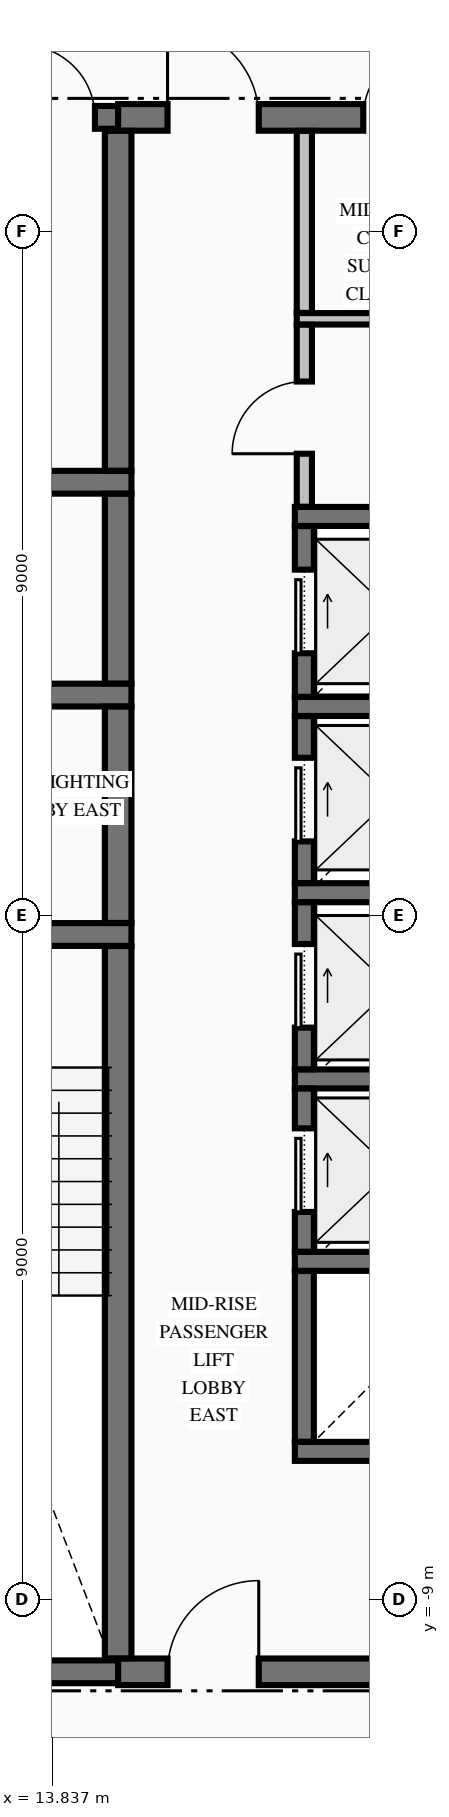
"""IFC4 building model, lengths in metres.
Left out: names, types, materials, properties, quantities, classifications, styles, units other than length and angle.
Written with IfcOpenShell. Run it as: python <this file> out.ifc"""

import sys

from ifc_helpers import new_model, si_unit, direction, frame, frame_2d, origin, place, context, subcontext, project, spatial, rectangle, extrude, element, fill, save


model = new_model("IFC4")
c1 = context("Model", 3, precision=1e-05, world=origin(), true_north=direction((0.0, 1.0)))
c2 = subcontext(c1, "Body", "Model", "MODEL_VIEW")
j1 = project(units=[si_unit("LENGTHUNIT", "METRE"), si_unit("PLANEANGLEUNIT", "RADIAN")], contexts=[c1])
p1 = place(None, origin())
s1 = spatial("IfcSite", under=j1, at=p1, CompositionType="ELEMENT")
p2 = place(p1, origin())
s2 = spatial("IfcBuilding", under=s1, at=p2, CompositionType="ELEMENT")
p3 = place(p2, frame((0.0, 0.0, 132.06)))
s3 = spatial("IfcBuildingStorey", under=s2, at=p3, CompositionType="ELEMENT", Elevation=132.06)
p4 = place(p3, frame((11.504, -9.95, 0.0), z_axis=(0.0, 0.0, 1.0), x_axis=(1.0, 0.0, 0.0)))
e1 = element("IfcWall", 1, at=p4, inside=s3, PredefinedType="SHEAR", context=c2, shape_type="SweptSolid", body=[
    extrude(rectangle(XDim=3.196, YDim=0.3, at=frame_2d((1.598, 0.0))), origin(), (0.0, 0.0, 1.0), 3.32),
])
p5 = place(p3, frame((14.7, -9.95, 0.0), z_axis=(0.0, 0.0, 1.0), x_axis=(1.0, 0.0, 0.0)))
e2 = element("IfcWall", 2, at=p5, inside=s3, PredefinedType="SHEAR", context=c2, shape_type="SweptSolid", body=[
    extrude(rectangle(XDim=4.796, YDim=0.35, at=frame_2d((2.398, 0.0))), origin(), (0.0, 0.0, 1.0), 3.32),
])
p6 = place(p5, frame((0.65, 0.0, 0.0)))
e3 = element("IfcOpeningElement", 3, at=p6, cuts=e2, PredefinedType="OPENING", context=c2, shape_type="SweptSolid", body=[
    extrude(rectangle(XDim=1.2, YDim=2.15, at=frame_2d((0.6, 1.075))), frame((0.0, 0.185, 0.0), z_axis=(0.0, -1.0, 0.0), x_axis=(1.0, 0.0, 0.0)), (0.0, 0.0, 1.0), 0.37),
])
for number, where, z_axis, x_axis in (
    (4, (17.025, -7.05, 0.0), (0.0, 0.0, 1.0), (1.0, 0.0, 0.0)),
    (5, (17.025, -4.55, 0.0), (0.0, 0.0, 1.0), (1.0, 0.0, 0.0)),
    (6, (17.025, -2.15, 0.0), (0.0, 0.0, 1.0), (1.0, 0.0, 0.0)),
):
    element("IfcWall", number, at=place(p3, frame(where, z_axis=z_axis, x_axis=x_axis)), inside=s3, PredefinedType="SOLIDWALL", context=c2, shape_type="SweptSolid", body=[
        extrude(rectangle(XDim=3.15, YDim=0.25, at=frame_2d((1.575, 0.0))), origin(), (0.0, 0.0, 1.0), 3.32),
    ])
p7 = place(p3, frame((11.504, -0.25, 0.0), z_axis=(0.0, 0.0, 1.0), x_axis=(1.0, 0.0, 0.0)))
e7 = element("IfcWall", 7, at=p7, inside=s3, PredefinedType="SHEAR", context=c2, shape_type="SweptSolid", body=[
    extrude(rectangle(XDim=3.371, YDim=0.3, at=frame_2d((1.686, 0.0))), origin(), (0.0, 0.0, 1.0), 3.32),
])
p8 = place(p7, frame((1.096, 0.0, 0.0)))
e8 = element("IfcOpeningElement", 8, at=p8, cuts=e7, PredefinedType="OPENING", context=c2, shape_type="SweptSolid", body=[
    extrude(rectangle(XDim=1.1, YDim=2.15, at=frame_2d((0.55, 1.075))), frame((0.0, 0.16, 0.0), z_axis=(0.0, -1.0, 0.0), x_axis=(1.0, 0.0, 0.0)), (0.0, 0.0, 1.0), 0.32),
])
p9 = place(p3, frame((17.025, 0.3, 0.0), z_axis=(0.0, 0.0, 1.0), x_axis=(1.0, 0.0, 0.0)))
e9 = element("IfcWall", 9, at=p9, inside=s3, PredefinedType="SOLIDWALL", context=c2, shape_type="SweptSolid", body=[
    extrude(rectangle(XDim=2.471, YDim=0.25, at=frame_2d((1.236, 0.0))), origin(), (0.0, 0.0, 1.0), 3.32),
])
p10 = place(p3, frame((17.025, 2.75, 0.0), z_axis=(0.0, 0.0, 1.0), x_axis=(1.0, 0.0, 0.0)))
e10 = element("IfcWall", 10, at=p10, inside=s3, PredefinedType="SOLIDWALL", context=c2, shape_type="SweptSolid", body=[
    extrude(rectangle(XDim=3.15, YDim=0.25, at=frame_2d((1.575, 0.0))), origin(), (0.0, 0.0, 1.0), 3.32),
])
p11 = place(p3, frame((10.85, 2.9, 0.0), z_axis=(0.0, 0.0, 1.0), x_axis=(1.0, 0.0, 0.0)))
e11 = element("IfcWall", 11, at=p11, inside=s3, PredefinedType="SHEAR", context=c2, shape_type="SweptSolid", body=[
    extrude(rectangle(XDim=4.025, YDim=0.3, at=frame_2d((2.012, 0.0))), origin(), (0.0, 0.0, 1.0), 3.32),
])
p12 = place(p11, frame((0.85, 0.0, 0.0)))
e12 = element("IfcOpeningElement", 12, at=p12, cuts=e11, PredefinedType="OPENING", context=c2, shape_type="SweptSolid", body=[
    extrude(rectangle(XDim=1.1, YDim=2.2, at=frame_2d((0.55, 1.1))), frame((0.0, 0.16, 0.0), z_axis=(0.0, -1.0, 0.0), x_axis=(1.0, 0.0, 0.0)), (0.0, 0.0, 1.0), 0.32),
])
p13 = place(p3, frame((17.025, 5.25, 0.0), z_axis=(0.0, 0.0, 1.0), x_axis=(1.0, 0.0, 0.0)))
e13 = element("IfcWall", 13, at=p13, inside=s3, PredefinedType="SOLIDWALL", context=c2, shape_type="SweptSolid", body=[
    extrude(rectangle(XDim=3.15, YDim=0.25, at=frame_2d((1.575, 0.0))), origin(), (0.0, 0.0, 1.0), 3.32),
])
p14 = place(p3, frame((10.85, 5.7, 0.0), z_axis=(0.0, 0.0, 1.0), x_axis=(1.0, 0.0, 0.0)))
e14 = element("IfcWall", 14, at=p14, inside=s3, PredefinedType="SHEAR", context=c2, shape_type="SweptSolid", body=[
    extrude(rectangle(XDim=4.025, YDim=0.3, at=frame_2d((2.012, 0.0))), origin(), (0.0, 0.0, 1.0), 3.32),
])
p15 = place(p3, frame((11.504, 10.5, 0.0), z_axis=(0.0, 0.0, 1.0), x_axis=(1.0, 0.0, 0.0)))
e15 = element("IfcWall", 15, at=p15, inside=s3, PredefinedType="SHEAR", context=c2, shape_type="SweptSolid", body=[
    extrude(rectangle(XDim=3.196, YDim=0.3, at=frame_2d((1.598, 0.0))), origin(), (0.0, 0.0, 1.0), 3.32),
])
p16 = place(p15, frame((1.941, 0.0, 0.0)))
e16 = element("IfcOpeningElement", 16, at=p16, cuts=e15, PredefinedType="OPENING", context=c2, shape_type="SweptSolid", body=[
    extrude(rectangle(XDim=0.95, YDim=2.15, at=frame_2d((0.475, 1.075))), frame((0.0, 0.16, 0.0), z_axis=(0.0, -1.0, 0.0), x_axis=(1.0, 0.0, 0.0)), (0.0, 0.0, 1.0), 0.32),
])
p17 = place(p3, frame((14.7, 10.5, 0.0), z_axis=(0.0, 0.0, 1.0), x_axis=(1.0, 0.0, 0.0)))
e17 = element("IfcWall", 17, at=p17, inside=s3, PredefinedType="SHEAR", context=c2, shape_type="SweptSolid", body=[
    extrude(rectangle(XDim=4.796, YDim=0.35, at=frame_2d((2.398, 0.0))), origin(), (0.0, 0.0, 1.0), 3.32),
])
p18 = place(p17, frame((0.65, 0.0, 0.0)))
e18 = element("IfcOpeningElement", 18, at=p18, cuts=e17, PredefinedType="OPENING", context=c2, shape_type="SweptSolid", body=[
    extrude(rectangle(XDim=1.2, YDim=2.15, at=frame_2d((0.6, 1.075))), frame((0.0, 0.185, 0.0), z_axis=(0.0, -1.0, 0.0), x_axis=(1.0, 0.0, 0.0)), (0.0, 0.0, 1.0), 0.37),
])
p19 = place(p17, frame((3.225, 0.0, 0.0)))
e19 = element("IfcOpeningElement", 19, at=p19, cuts=e17, PredefinedType="OPENING", context=c2, shape_type="SweptSolid", body=[
    extrude(rectangle(XDim=0.95, YDim=2.15, at=frame_2d((0.475, 1.075))), frame((0.0, 0.185, 0.0), z_axis=(0.0, -1.0, 0.0), x_axis=(1.0, 0.0, 0.0)), (0.0, 0.0, 1.0), 0.37),
])
p20 = place(p3, frame((17.05, 7.85, 0.0), z_axis=(0.0, 0.0, 1.0), x_axis=(1.0, 0.0, 0.0)))
e20 = element("IfcWall", 20, at=p20, inside=s3, PredefinedType="PARTITIONING", context=c2, shape_type="SweptSolid", body=[
    extrude(rectangle(XDim=2.772, YDim=0.15, at=frame_2d((1.386, 0.0))), origin(), (0.0, 0.0, 1.0), 3.32),
])
p21 = place(p3, frame((14.7, -9.773, 0.0), z_axis=(0.0, 0.0, 1.0), x_axis=(0.0, 1.0, 0.0)))
e21 = element("IfcWall", 21, at=p21, inside=s3, PredefinedType="SHEAR", context=c2, shape_type="SweptSolid", body=[
    extrude(rectangle(XDim=9.371, YDim=0.35, at=frame_2d((4.686, 0.0))), origin(), (0.0, 0.0, 1.0), 3.32),
])
p22 = place(p3, frame((14.7, -0.098, 0.0), z_axis=(0.0, 0.0, 1.0), x_axis=(0.0, 1.0, 0.0)))
e22 = element("IfcWall", 22, at=p22, inside=s3, PredefinedType="SHEAR", context=c2, shape_type="SweptSolid", body=[
    extrude(rectangle(XDim=2.846, YDim=0.35, at=frame_2d((1.423, 0.0))), origin(), (0.0, 0.0, 1.0), 3.32),
])
p23 = place(p3, frame((14.7, 3.052, 0.0), z_axis=(0.0, 0.0, 1.0), x_axis=(0.0, 1.0, 0.0)))
e23 = element("IfcWall", 23, at=p23, inside=s3, PredefinedType="SHEAR", context=c2, shape_type="SweptSolid", body=[
    extrude(rectangle(XDim=2.496, YDim=0.35, at=frame_2d((1.248, 0.0))), origin(), (0.0, 0.0, 1.0), 3.32),
])
p24 = place(p3, frame((14.7, 5.852, 0.0), z_axis=(0.0, 0.0, 1.0), x_axis=(0.0, 1.0, 0.0)))
e24 = element("IfcWall", 24, at=p24, inside=s3, PredefinedType="SHEAR", context=c2, shape_type="SweptSolid", body=[
    extrude(rectangle(XDim=4.471, YDim=0.35, at=frame_2d((2.235, 0.0))), origin(), (0.0, 0.0, 1.0), 3.32),
])
p25 = place(p3, frame((17.15, -6.923, 0.0), z_axis=(0.0, 0.0, 1.0), x_axis=(0.0, 1.0, 0.0)))
e25 = element("IfcWall", 25, at=p25, inside=s3, PredefinedType="SOLIDWALL", context=c2, shape_type="SweptSolid", body=[
    extrude(rectangle(XDim=2.246, YDim=0.25, at=frame_2d((1.123, 0.0))), origin(), (0.0, 0.0, 1.0), 3.32),
])
p26 = place(p3, frame((17.15, -4.423, 0.0), z_axis=(0.0, 0.0, 1.0), x_axis=(0.0, 1.0, 0.0)))
e26 = element("IfcWall", 26, at=p26, inside=s3, PredefinedType="SOLIDWALL", context=c2, shape_type="SweptSolid", body=[
    extrude(rectangle(XDim=2.146, YDim=0.25, at=frame_2d((1.073, 0.0))), origin(), (0.0, 0.0, 1.0), 3.32),
])
p27 = place(p26, frame((0.523, 0.0, 0.0)))
e27 = element("IfcOpeningElement", 27, at=p27, cuts=e26, PredefinedType="OPENING", context=c2, shape_type="SweptSolid", body=[
    extrude(rectangle(XDim=1.1, YDim=2.2, at=frame_2d((0.55, 1.1))), frame((0.0, 0.135, 0.0), z_axis=(0.0, -1.0, 0.0), x_axis=(1.0, 0.0, 0.0)), (0.0, 0.0, 1.0), 0.27),
])
p28 = place(p3, frame((17.15, -2.023, 0.0), z_axis=(0.0, 0.0, 1.0), x_axis=(0.0, 1.0, 0.0)))
e28 = element("IfcWall", 28, at=p28, inside=s3, PredefinedType="SOLIDWALL", context=c2, shape_type="SweptSolid", body=[
    extrude(rectangle(XDim=2.196, YDim=0.25, at=frame_2d((1.098, 0.0))), origin(), (0.0, 0.0, 1.0), 3.32),
])
p29 = place(p28, frame((0.548, 0.0, 0.0)))
e29 = element("IfcOpeningElement", 29, at=p29, cuts=e28, PredefinedType="OPENING", context=c2, shape_type="SweptSolid", body=[
    extrude(rectangle(XDim=1.1, YDim=2.2, at=frame_2d((0.55, 1.1))), frame((0.0, 0.135, 0.0), z_axis=(0.0, -1.0, 0.0), x_axis=(1.0, 0.0, 0.0)), (0.0, 0.0, 1.0), 0.27),
])
p30 = place(p3, frame((17.15, 0.427, 0.0), z_axis=(0.0, 0.0, 1.0), x_axis=(0.0, 1.0, 0.0)))
e30 = element("IfcWall", 30, at=p30, inside=s3, PredefinedType="SOLIDWALL", context=c2, shape_type="SweptSolid", body=[
    extrude(rectangle(XDim=2.196, YDim=0.25, at=frame_2d((1.098, 0.0))), origin(), (0.0, 0.0, 1.0), 3.32),
])
p31 = place(p30, frame((0.548, 0.0, 0.0)))
e31 = element("IfcOpeningElement", 31, at=p31, cuts=e30, PredefinedType="OPENING", context=c2, shape_type="SweptSolid", body=[
    extrude(rectangle(XDim=1.1, YDim=2.2, at=frame_2d((0.55, 1.1))), frame((0.0, 0.135, 0.0), z_axis=(0.0, -1.0, 0.0), x_axis=(1.0, 0.0, 0.0)), (0.0, 0.0, 1.0), 0.27),
])
p32 = place(p3, frame((17.15, 2.877, 0.0), z_axis=(0.0, 0.0, 1.0), x_axis=(0.0, 1.0, 0.0)))
e32 = element("IfcWall", 32, at=p32, inside=s3, PredefinedType="SOLIDWALL", context=c2, shape_type="SweptSolid", body=[
    extrude(rectangle(XDim=2.246, YDim=0.25, at=frame_2d((1.123, 0.0))), origin(), (0.0, 0.0, 1.0), 3.32),
])
p33 = place(p32, frame((0.573, 0.0, 0.0)))
e33 = element("IfcOpeningElement", 33, at=p33, cuts=e32, PredefinedType="OPENING", context=c2, shape_type="SweptSolid", body=[
    extrude(rectangle(XDim=1.1, YDim=2.2, at=frame_2d((0.55, 1.1))), frame((0.0, 0.135, 0.0), z_axis=(0.0, -1.0, 0.0), x_axis=(1.0, 0.0, 0.0)), (0.0, 0.0, 1.0), 0.27),
])
p34 = place(p3, frame((17.15, 5.378, 0.0), z_axis=(0.0, 0.0, 1.0), x_axis=(0.0, 1.0, 0.0)))
e34 = element("IfcWall", 34, at=p34, inside=s3, PredefinedType="PARTITIONING", context=c2, shape_type="SweptSolid", body=[
    extrude(rectangle(XDim=2.394, YDim=0.2, at=frame_2d((1.197, 0.0))), origin(), (0.0, 0.0, 1.0), 3.32),
])
p35 = place(p34, frame((0.697, 0.0, 0.0)))
e35 = element("IfcOpeningElement", 35, at=p35, cuts=e34, PredefinedType="OPENING", context=c2, shape_type="SweptSolid", body=[
    extrude(rectangle(XDim=0.95, YDim=2.15, at=frame_2d((0.475, 1.075))), frame((0.0, 0.11, 0.0), z_axis=(0.0, -1.0, 0.0), x_axis=(1.0, 0.0, 0.0)), (0.0, 0.0, 1.0), 0.22),
])
p36 = place(p3, frame((17.15, 7.928, 0.0), z_axis=(0.0, 0.0, 1.0), x_axis=(0.0, 1.0, 0.0)))
e36 = element("IfcWall", 36, at=p36, inside=s3, PredefinedType="PARTITIONING", context=c2, shape_type="SweptSolid", body=[
    extrude(rectangle(XDim=2.394, YDim=0.2, at=frame_2d((1.197, 0.0))), origin(), (0.0, 0.0, 1.0), 3.32),
])
p37 = place(p16, origin())
e37 = element("IfcDoor", 37, at=p37, inside=s3, OperationType="SINGLE_SWING_LEFT", PredefinedType="DOOR", context=c2, shape_type="SweptSolid", body=[
    extrude(rectangle(XDim=0.95, YDim=2.15, at=frame_2d((0.475, 1.075))), frame((0.0, 0.025, 0.0), z_axis=(0.0, -1.0, 0.0), x_axis=(1.0, 0.0, 0.0)), (0.0, 0.0, 1.0), 0.05),
])
fill(e16, e37)
p38 = place(p27, origin())
e38 = element("IfcDoor", 38, at=p38, inside=s3, OperationType="SLIDING_TO_RIGHT", PredefinedType="DOOR", context=c2, shape_type="SweptSolid", body=[
    extrude(rectangle(XDim=1.1, YDim=2.2, at=frame_2d((0.55, 1.1))), frame((0.0, 0.025, 0.0), z_axis=(0.0, -1.0, 0.0), x_axis=(1.0, 0.0, 0.0)), (0.0, 0.0, 1.0), 0.05),
])
fill(e27, e38)
p39 = place(p29, origin())
e39 = element("IfcDoor", 39, at=p39, inside=s3, OperationType="SLIDING_TO_RIGHT", PredefinedType="DOOR", context=c2, shape_type="SweptSolid", body=[
    extrude(rectangle(XDim=1.1, YDim=2.2, at=frame_2d((0.55, 1.1))), frame((0.0, 0.025, 0.0), z_axis=(0.0, -1.0, 0.0), x_axis=(1.0, 0.0, 0.0)), (0.0, 0.0, 1.0), 0.05),
])
fill(e29, e39)
p40 = place(p31, origin())
e40 = element("IfcDoor", 40, at=p40, inside=s3, OperationType="SLIDING_TO_RIGHT", PredefinedType="DOOR", context=c2, shape_type="SweptSolid", body=[
    extrude(rectangle(XDim=1.1, YDim=2.2, at=frame_2d((0.55, 1.1))), frame((0.0, 0.025, 0.0), z_axis=(0.0, -1.0, 0.0), x_axis=(1.0, 0.0, 0.0)), (0.0, 0.0, 1.0), 0.05),
])
fill(e31, e40)
p41 = place(p33, origin())
e41 = element("IfcDoor", 41, at=p41, inside=s3, OperationType="SLIDING_TO_RIGHT", PredefinedType="DOOR", context=c2, shape_type="SweptSolid", body=[
    extrude(rectangle(XDim=1.1, YDim=2.2, at=frame_2d((0.55, 1.1))), frame((0.0, 0.025, 0.0), z_axis=(0.0, -1.0, 0.0), x_axis=(1.0, 0.0, 0.0)), (0.0, 0.0, 1.0), 0.05),
])
fill(e33, e41)
p42 = place(p6, origin())
e42 = element("IfcDoor", 42, at=p42, inside=s3, OperationType="SINGLE_SWING_RIGHT", PredefinedType="DOOR", context=c2, shape_type="SweptSolid", body=[
    extrude(rectangle(XDim=1.2, YDim=2.15, at=frame_2d((0.6, 1.075))), frame((0.0, 0.025, 0.0), z_axis=(0.0, -1.0, 0.0), x_axis=(1.0, 0.0, 0.0)), (0.0, 0.0, 1.0), 0.05),
])
fill(e3, e42)
p43 = place(p18, origin())
e43 = element("IfcDoor", 43, at=p43, inside=s3, OperationType="SINGLE_SWING_LEFT", PredefinedType="DOOR", context=c2, shape_type="SweptSolid", body=[
    extrude(rectangle(XDim=1.2, YDim=2.15, at=frame_2d((0.6, 1.075))), frame((0.0, 0.025, 0.0), z_axis=(0.0, -1.0, 0.0), x_axis=(1.0, 0.0, 0.0)), (0.0, 0.0, 1.0), 0.05),
])
fill(e18, e43)
p44 = place(p19, origin())
e44 = element("IfcDoor", 44, at=p44, inside=s3, OperationType="SINGLE_SWING_RIGHT", PredefinedType="DOOR", context=c2, shape_type="SweptSolid", body=[
    extrude(rectangle(XDim=0.95, YDim=2.15, at=frame_2d((0.475, 1.075))), frame((0.0, 0.025, 0.0), z_axis=(0.0, -1.0, 0.0), x_axis=(1.0, 0.0, 0.0)), (0.0, 0.0, 1.0), 0.05),
])
fill(e19, e44)
p45 = place(p35, origin())
e45 = element("IfcDoor", 45, at=p45, inside=s3, OperationType="SINGLE_SWING_LEFT", PredefinedType="DOOR", context=c2, shape_type="SweptSolid", body=[
    extrude(rectangle(XDim=0.95, YDim=2.15, at=frame_2d((0.475, 1.075))), frame((0.0, 0.025, 0.0), z_axis=(0.0, -1.0, 0.0), x_axis=(1.0, 0.0, 0.0)), (0.0, 0.0, 1.0), 0.05),
])
fill(e35, e45)
save(model, sys.argv[1])
